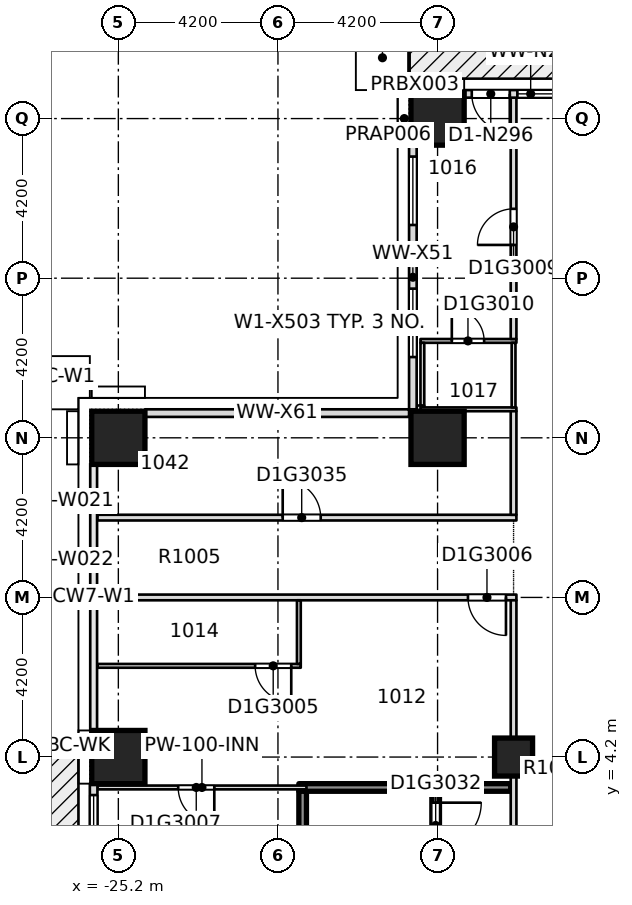
"""IFC4 building model, lengths in metres.
Left out: names, types, materials, properties, quantities, classifications, styles, units other than length and angle.
Written with IfcOpenShell. Run it as: python <this file> out.ifc"""

import sys

from ifc_helpers import new_model, si_unit, direction, frame, frame_2d, origin, origin_2d, place, context, subcontext, project, spatial, rectangle, extrude, element, fill, save


model = new_model("IFC4")
c1 = context("Model", 3, precision=1e-05, world=origin(), true_north=direction((0.0, 1.0)))
c2 = subcontext(c1, "Body", "Model", "MODEL_VIEW")
j1 = project(units=[si_unit("LENGTHUNIT", "METRE"), si_unit("PLANEANGLEUNIT", "RADIAN")], contexts=[c1])
p1 = place(None, origin())
s1 = spatial("IfcSite", under=j1, at=p1, CompositionType="ELEMENT")
p2 = place(p1, origin())
s2 = spatial("IfcBuilding", under=s1, at=p2, CompositionType="ELEMENT")
p3 = place(p2, frame((0.0, 0.0, 48.3)))
s3 = spatial("IfcBuildingStorey", under=s2, at=p3, CompositionType="ELEMENT", Elevation=48.3)
for number, where, z_axis, x_axis in (
    (1, (-25.2, 4.2, -0.32), (0.0, 0.0, 1.0), (1.0, 0.0, 0.0)),
    (2, (-25.2, 12.6, -0.32), (0.0, 0.0, 1.0), (1.0, 0.0, 0.0)),
    (3, (-16.8, 12.6, -0.32), (0.0, 0.0, 1.0), (1.0, 0.0, 0.0)),
    (4, (-16.8, 21.0, -0.32), (0.0, 0.0, 1.0), (1.0, 0.0, 0.0)),
):
    element("IfcColumn", number, at=place(p3, frame(where, z_axis=z_axis, x_axis=x_axis)), inside=s3, PredefinedType="COLUMN", context=c2, shape_type="SweptSolid", body=[
        extrude(rectangle(XDim=1.4, YDim=1.4, at=origin_2d()), origin(), (0.0, 0.0, 1.0), 3.45),
    ])
p4 = place(p3, frame((-14.8, 4.2, -0.32), z_axis=(0.0, 0.0, 1.0), x_axis=(1.0, 0.0, 0.0)))
e5 = element("IfcColumn", 5, at=p4, inside=s3, PredefinedType="COLUMN", context=c2, shape_type="SweptSolid", body=[
    extrude(rectangle(XDim=1.0, YDim=1.0, at=origin_2d()), origin(), (0.0, 0.0, 1.0), 3.45),
])
p5 = place(p3, frame((-25.75, 3.4, 0.0), z_axis=(0.0, 0.0, 1.0), x_axis=(1.0, 0.0, 0.0)))
e6 = element("IfcWall", 6, at=p5, inside=s3, PredefinedType="PARTITIONING", context=c2, shape_type="SweptSolid", body=[
    extrude(rectangle(XDim=5.5, YDim=0.1, at=frame_2d((2.75, 0.0))), origin(), (0.0, 0.0, 1.0), 3.13),
])
p6 = place(p5, frame((2.125, 0.0, 0.0)))
e7 = element("IfcOpeningElement", 7, at=p6, cuts=e6, PredefinedType="OPENING", context=c2, shape_type="SweptSolid", body=[
    extrude(rectangle(XDim=0.95, YDim=2.1, at=frame_2d((0.475, 1.05))), frame((0.0, 0.06, 0.0), z_axis=(0.0, -1.0, 0.0), x_axis=(1.0, 0.0, 0.0)), (0.0, 0.0, 1.0), 0.12),
])
p7 = place(p3, frame((-20.45, 3.4, 0.0), z_axis=(0.0, 0.0, 1.0), x_axis=(1.0, 0.0, 0.0)))
e8 = element("IfcWall", 8, at=p7, inside=s3, PredefinedType="SOLIDWALL", context=c2, shape_type="SweptSolid", body=[
    extrude(rectangle(XDim=5.575, YDim=0.2, at=frame_2d((2.788, 0.0))), origin(), (0.0, 0.0, 1.0), 3.13),
])
p8 = place(p3, frame((-25.75, 6.6, 0.0), z_axis=(0.0, 0.0, 1.0), x_axis=(1.0, 0.0, 0.0)))
e9 = element("IfcWall", 9, at=p8, inside=s3, PredefinedType="PARTITIONING", context=c2, shape_type="SweptSolid", body=[
    extrude(rectangle(XDim=5.35, YDim=0.1, at=frame_2d((2.675, 0.0))), origin(), (0.0, 0.0, 1.0), 3.13),
])
p9 = place(p8, frame((4.15, 0.0, 0.0)))
e10 = element("IfcOpeningElement", 10, at=p9, cuts=e9, PredefinedType="OPENING", context=c2, shape_type="SweptSolid", body=[
    extrude(rectangle(XDim=0.95, YDim=2.1, at=frame_2d((0.475, 1.05))), frame((0.0, 0.06, 0.0), z_axis=(0.0, -1.0, 0.0), x_axis=(1.0, 0.0, 0.0)), (0.0, 0.0, 1.0), 0.12),
])
p10 = place(p3, frame((-25.75, 8.4, 0.0), z_axis=(0.0, 0.0, 1.0), x_axis=(1.0, 0.0, 0.0)))
e11 = element("IfcWall", 11, at=p10, inside=s3, PredefinedType="PARTITIONING", context=c2, shape_type="SweptSolid", body=[
    extrude(rectangle(XDim=11.025, YDim=0.15, at=frame_2d((5.512, 0.0))), origin(), (0.0, 0.0, 1.0), 3.13),
])
p11 = place(p10, frame((9.75, 0.0, 0.0)))
e12 = element("IfcOpeningElement", 12, at=p11, cuts=e11, PredefinedType="OPENING", context=c2, shape_type="SweptSolid", body=[
    extrude(rectangle(XDim=1.0, YDim=2.1, at=frame_2d((0.5, 1.05))), frame((0.0, 0.085, 0.0), z_axis=(0.0, -1.0, 0.0), x_axis=(1.0, 0.0, 0.0)), (0.0, 0.0, 1.0), 0.17),
])
p12 = place(p3, frame((-25.75, 10.5, 0.0), z_axis=(0.0, 0.0, 1.0), x_axis=(1.0, 0.0, 0.0)))
e13 = element("IfcWall", 13, at=p12, inside=s3, PredefinedType="PARTITIONING", context=c2, shape_type="SweptSolid", body=[
    extrude(rectangle(XDim=11.025, YDim=0.15, at=frame_2d((5.512, 0.0))), origin(), (0.0, 0.0, 1.0), 3.13),
])
p13 = place(p12, frame((4.875, 0.0, 0.0)))
e14 = element("IfcOpeningElement", 14, at=p13, cuts=e13, PredefinedType="OPENING", context=c2, shape_type="SweptSolid", body=[
    extrude(rectangle(XDim=1.0, YDim=2.1, at=frame_2d((0.5, 1.05))), frame((0.0, 0.085, 0.0), z_axis=(0.0, -1.0, 0.0), x_axis=(1.0, 0.0, 0.0)), (0.0, 0.0, 1.0), 0.17),
])
p14 = place(p3, frame((-17.35, 13.35, 0.0), z_axis=(0.0, 0.0, 1.0), x_axis=(1.0, 0.0, 0.0)))
e15 = element("IfcWall", 15, at=p14, inside=s3, PredefinedType="PARTITIONING", context=c2, shape_type="SweptSolid", body=[
    extrude(rectangle(XDim=0.2, YDim=0.2, at=frame_2d((0.1, 0.0))), origin(), (0.0, 0.0, 1.0), 3.13),
])
p15 = place(p3, frame((-17.25, 13.35, 0.0), z_axis=(0.0, 0.0, 1.0), x_axis=(1.0, 0.0, 0.0)))
e16 = element("IfcWall", 16, at=p15, inside=s3, PredefinedType="PARTITIONING", context=c2, shape_type="SweptSolid", body=[
    extrude(rectangle(XDim=2.525, YDim=0.1, at=frame_2d((1.262, 0.0))), origin(), (0.0, 0.0, 1.0), 3.13),
])
p16 = place(p3, frame((-17.25, 15.15, 0.0), z_axis=(0.0, 0.0, 1.0), x_axis=(1.0, 0.0, 0.0)))
e17 = element("IfcWall", 17, at=p16, inside=s3, PredefinedType="PARTITIONING", context=c2, shape_type="SweptSolid", body=[
    extrude(rectangle(XDim=2.525, YDim=0.1, at=frame_2d((1.262, 0.0))), origin(), (0.0, 0.0, 1.0), 3.13),
])
p17 = place(p16, frame((0.825, 0.0, 0.0)))
e18 = element("IfcOpeningElement", 18, at=p17, cuts=e17, PredefinedType="OPENING", context=c2, shape_type="SweptSolid", body=[
    extrude(rectangle(XDim=0.85, YDim=2.1, at=frame_2d((0.425, 1.05))), frame((0.0, 0.06, 0.0), z_axis=(0.0, -1.0, 0.0), x_axis=(1.0, 0.0, 0.0)), (0.0, 0.0, 1.0), 0.12),
])
p18 = place(p3, frame((-20.45, 6.65, 0.0), z_axis=(0.0, 0.0, 1.0), x_axis=(0.0, 1.0, 0.0)))
e19 = element("IfcWall", 19, at=p18, inside=s3, PredefinedType="PARTITIONING", context=c2, shape_type="SweptSolid", body=[
    extrude(rectangle(XDim=1.675, YDim=0.1, at=frame_2d((0.837, 0.0))), origin(), (0.0, 0.0, 1.0), 3.13),
])
p19 = place(p3, frame((-20.35, 0.07, 0.0), z_axis=(0.0, 0.0, 1.0), x_axis=(0.0, 1.0, 0.0)))
e20 = element("IfcWall", 20, at=p19, inside=s3, PredefinedType="SOLIDWALL", context=c2, shape_type="SweptSolid", body=[
    extrude(rectangle(XDim=3.23, YDim=0.2, at=frame_2d((1.615, 0.0))), origin(), (0.0, 0.0, 1.0), 3.13),
])
p20 = place(p3, frame((-17.2, 13.45, 0.0), z_axis=(0.0, 0.0, 1.0), x_axis=(0.0, 1.0, 0.0)))
e21 = element("IfcWall", 21, at=p20, inside=s3, PredefinedType="PARTITIONING", context=c2, shape_type="SweptSolid", body=[
    extrude(rectangle(XDim=1.65, YDim=0.1, at=frame_2d((0.825, 0.0))), origin(), (0.0, 0.0, 1.0), 3.13),
])
p21 = place(p3, frame((-16.85, -3.35, 0.0), z_axis=(0.0, 0.0, 1.0), x_axis=(0.0, 1.0, 0.0)))
e22 = element("IfcWall", 22, at=p21, inside=s3, PredefinedType="SOLIDWALL", context=c2, shape_type="SweptSolid", body=[
    extrude(rectangle(XDim=6.65, YDim=0.2, at=frame_2d((3.325, 0.0))), origin(), (0.0, 0.0, 1.0), 3.13),
])
p22 = place(p21, frame((5.15, 0.0, 0.0)))
e23 = element("IfcOpeningElement", 23, at=p22, cuts=e22, PredefinedType="OPENING", context=c2, shape_type="SweptSolid", body=[
    extrude(rectangle(XDim=1.2, YDim=2.1, at=frame_2d((0.6, 1.05))), frame((0.0, 0.11, 0.0), z_axis=(0.0, -1.0, 0.0), x_axis=(1.0, 0.0, 0.0)), (0.0, 0.0, 1.0), 0.22),
])
p23 = place(p3, frame((-14.8, -3.35, 0.0), z_axis=(0.0, 0.0, 1.0), x_axis=(0.0, 1.0, 0.0)))
e24 = element("IfcWall", 24, at=p23, inside=s3, PredefinedType="PARTITIONING", context=c2, shape_type="SweptSolid", body=[
    extrude(rectangle(XDim=11.675, YDim=0.15, at=frame_2d((5.837, 0.0))), origin(), (0.0, 0.0, 1.0), 3.13),
])
p24 = place(p23, frame((2.8, 0.0, 0.0)))
e25 = element("IfcOpeningElement", 25, at=p24, cuts=e24, PredefinedType="OPENING", context=c2, shape_type="SweptSolid", body=[
    extrude(rectangle(XDim=1.1, YDim=2.1, at=frame_2d((0.55, 1.05))), frame((0.0, 0.085, 0.0), z_axis=(0.0, -1.0, 0.0), x_axis=(1.0, 0.0, 0.0)), (0.0, 0.0, 1.0), 0.17),
])
p25 = place(p3, frame((-14.8, 10.575, 0.0), z_axis=(0.0, 0.0, 1.0), x_axis=(0.0, 1.0, 0.0)))
e26 = element("IfcWall", 26, at=p25, inside=s3, PredefinedType="PARTITIONING", context=c2, shape_type="SweptSolid", body=[
    extrude(rectangle(XDim=2.725, YDim=0.15, at=frame_2d((1.363, 0.0))), origin(), (0.0, 0.0, 1.0), 3.13),
])
p26 = place(p3, frame((-14.8, 13.4, 0.0), z_axis=(0.0, 0.0, 1.0), x_axis=(0.0, 1.0, 0.0)))
e27 = element("IfcWall", 27, at=p26, inside=s3, PredefinedType="PARTITIONING", context=c2, shape_type="SweptSolid", body=[
    extrude(rectangle(XDim=1.7, YDim=0.1, at=frame_2d((0.85, 0.0))), origin(), (0.0, 0.0, 1.0), 3.13),
])
p27 = place(p3, frame((-14.8, 15.2, 0.0), z_axis=(0.0, 0.0, 1.0), x_axis=(0.0, 1.0, 0.0)))
e28 = element("IfcWall", 28, at=p27, inside=s3, PredefinedType="PARTITIONING", context=c2, shape_type="SweptSolid", body=[
    extrude(rectangle(XDim=6.35, YDim=0.15, at=frame_2d((3.175, 0.0))), origin(), (0.0, 0.0, 1.0), 3.13),
])
p28 = place(p27, frame((2.475, 0.0, 0.0)))
e29 = element("IfcOpeningElement", 29, at=p28, cuts=e28, PredefinedType="OPENING", context=c2, shape_type="SweptSolid", body=[
    extrude(rectangle(XDim=0.95, YDim=2.1, at=frame_2d((0.475, 1.05))), frame((0.0, 0.085, 0.0), z_axis=(0.0, -1.0, 0.0), x_axis=(1.0, 0.0, 0.0)), (0.0, 0.0, 1.0), 0.17),
])
p29 = place(p3, frame((-12.6, 21.65, 0.0), z_axis=(0.0, 0.0, 1.0), x_axis=(-1.0, 0.0, 0.0)))
e30 = element("IfcWall", 30, at=p29, inside=s3, PredefinedType="STANDARD", context=c2, shape_type="SweptSolid", body=[
    extrude(rectangle(XDim=3.5, YDim=0.2, at=frame_2d((1.75, 0.0))), origin(), (0.0, 0.0, 1.0), 3.13),
])
p30 = place(p29, frame((0.3, 0.0, 0.2)))
e31 = element("IfcOpeningElement", 31, at=p30, cuts=e30, PredefinedType="OPENING", context=c2, shape_type="SweptSolid", body=[
    extrude(rectangle(XDim=1.8, YDim=2.65, at=frame_2d((0.9, 1.325))), frame((0.0, 0.11, 0.0), z_axis=(0.0, -1.0, 0.0), x_axis=(1.0, 0.0, 0.0)), (0.0, 0.0, 1.0), 0.22),
])
p31 = place(p29, frame((2.3, 0.0, 0.0)))
e32 = element("IfcOpeningElement", 32, at=p31, cuts=e30, PredefinedType="OPENING", context=c2, shape_type="SweptSolid", body=[
    extrude(rectangle(XDim=1.0, YDim=2.4, at=frame_2d((0.5, 1.2))), frame((0.0, 0.11, 0.0), z_axis=(0.0, -1.0, 0.0), x_axis=(1.0, 0.0, 0.0)), (0.0, 0.0, 1.0), 0.22),
])
p32 = place(p3, frame((-17.45, 20.3, 0.0), z_axis=(0.0, 0.0, 1.0), x_axis=(0.0, -1.0, 0.0)))
e33 = element("IfcWall", 33, at=p32, inside=s3, PredefinedType="STANDARD", context=c2, shape_type="SweptSolid", body=[
    extrude(rectangle(XDim=6.95, YDim=0.2, at=frame_2d((3.475, 0.0))), origin(), (0.0, 0.0, 1.0), 3.13),
])
p33 = place(p32, frame((3.775, 0.0, 0.2)))
e34 = element("IfcOpeningElement", 34, at=p33, cuts=e33, PredefinedType="OPENING", context=c2, shape_type="SweptSolid", body=[
    extrude(rectangle(XDim=1.8, YDim=2.65, at=frame_2d((0.9, 1.325))), frame((0.0, 0.11, 0.0), z_axis=(0.0, -1.0, 0.0), x_axis=(1.0, 0.0, 0.0)), (0.0, 0.0, 1.0), 0.22),
])
p34 = place(p32, frame((0.3, 0.0, 0.2)))
e35 = element("IfcOpeningElement", 35, at=p34, cuts=e33, PredefinedType="OPENING", context=c2, shape_type="SweptSolid", body=[
    extrude(rectangle(XDim=1.8, YDim=2.65, at=frame_2d((0.9, 1.325))), frame((0.0, 0.11, 0.0), z_axis=(0.0, -1.0, 0.0), x_axis=(1.0, 0.0, 0.0)), (0.0, 0.0, 1.0), 0.22),
])
p35 = place(p3, frame((-17.55, 13.25, 0.0), z_axis=(0.0, 0.0, 1.0), x_axis=(-1.0, 0.0, 0.0)))
e36 = element("IfcWall", 36, at=p35, inside=s3, PredefinedType="STANDARD", context=c2, shape_type="SweptSolid", body=[
    extrude(rectangle(XDim=6.95, YDim=0.2, at=frame_2d((3.475, 0.0))), origin(), (0.0, 0.0, 1.0), 3.13),
])
p36 = place(p3, frame((-25.85, 3.5, 0.0), z_axis=(0.0, 0.0, 1.0), x_axis=(0.0, -1.0, 0.0)))
e37 = element("IfcWall", 37, at=p36, inside=s3, PredefinedType="STANDARD", context=c2, shape_type="SweptSolid", body=[
    extrude(rectangle(XDim=7.0, YDim=0.2, at=frame_2d((3.5, 0.0))), origin(), (0.0, 0.0, 1.0), 3.13),
])
p37 = place(p36, frame((3.8, 0.0, 0.2)))
e38 = element("IfcOpeningElement", 38, at=p37, cuts=e37, PredefinedType="OPENING", context=c2, shape_type="SweptSolid", body=[
    extrude(rectangle(XDim=1.8, YDim=2.65, at=frame_2d((0.9, 1.325))), frame((0.0, 0.11, 0.0), z_axis=(0.0, -1.0, 0.0), x_axis=(1.0, 0.0, 0.0)), (0.0, 0.0, 1.0), 0.22),
])
p38 = place(p36, frame((5.7, 0.0, 0.0)))
e39 = element("IfcOpeningElement", 39, at=p38, cuts=e37, PredefinedType="OPENING", context=c2, shape_type="SweptSolid", body=[
    extrude(rectangle(XDim=1.0, YDim=2.4, at=frame_2d((0.5, 1.2))), frame((0.0, 0.11, 0.0), z_axis=(0.0, -1.0, 0.0), x_axis=(1.0, 0.0, 0.0)), (0.0, 0.0, 1.0), 0.22),
])
p39 = place(p36, frame((0.3, 0.0, 0.2)))
e40 = element("IfcOpeningElement", 40, at=p39, cuts=e37, PredefinedType="OPENING", context=c2, shape_type="SweptSolid", body=[
    extrude(rectangle(XDim=1.8, YDim=2.65, at=frame_2d((0.9, 1.325))), frame((0.0, 0.11, 0.0), z_axis=(0.0, -1.0, 0.0), x_axis=(1.0, 0.0, 0.0)), (0.0, 0.0, 1.0), 0.22),
])
p40 = place(p36, frame((2.2, 0.0, 0.0)))
e41 = element("IfcOpeningElement", 41, at=p40, cuts=e37, PredefinedType="OPENING", context=c2, shape_type="SweptSolid", body=[
    extrude(rectangle(XDim=1.0, YDim=2.4, at=frame_2d((0.5, 1.2))), frame((0.0, 0.11, 0.0), z_axis=(0.0, -1.0, 0.0), x_axis=(1.0, 0.0, 0.0)), (0.0, 0.0, 1.0), 0.22),
])
p41 = place(p9, origin())
e42 = element("IfcDoor", 42, at=p41, inside=s3, OperationType="SINGLE_SWING_LEFT", PredefinedType="DOOR", context=c2, shape_type="SweptSolid", body=[
    extrude(rectangle(XDim=0.95, YDim=2.1, at=frame_2d((0.475, 1.05))), frame((0.0, 0.025, 0.0), z_axis=(0.0, -1.0, 0.0), x_axis=(1.0, 0.0, 0.0)), (0.0, 0.0, 1.0), 0.05),
])
fill(e10, e42)
p42 = place(p11, origin())
e43 = element("IfcDoor", 43, at=p42, inside=s3, OperationType="SINGLE_SWING_RIGHT", PredefinedType="DOOR", context=c2, shape_type="SweptSolid", body=[
    extrude(rectangle(XDim=1.0, YDim=2.1, at=frame_2d((0.5, 1.05))), frame((0.0, 0.025, 0.0), z_axis=(0.0, -1.0, 0.0), x_axis=(1.0, 0.0, 0.0)), (0.0, 0.0, 1.0), 0.05),
])
fill(e12, e43)
p43 = place(p6, origin())
e44 = element("IfcDoor", 44, at=p43, inside=s3, OperationType="SINGLE_SWING_LEFT", PredefinedType="DOOR", context=c2, shape_type="SweptSolid", body=[
    extrude(rectangle(XDim=0.95, YDim=2.1, at=frame_2d((0.475, 1.05))), frame((0.0, 0.025, 0.0), z_axis=(0.0, -1.0, 0.0), x_axis=(1.0, 0.0, 0.0)), (0.0, 0.0, 1.0), 0.05),
])
fill(e7, e44)
p44 = place(p28, origin())
e45 = element("IfcDoor", 45, at=p44, inside=s3, OperationType="SINGLE_SWING_RIGHT", PredefinedType="DOOR", context=c2, shape_type="SweptSolid", body=[
    extrude(rectangle(XDim=0.95, YDim=2.1, at=frame_2d((0.475, 1.05))), frame((0.0, 0.025, 0.0), z_axis=(0.0, -1.0, 0.0), x_axis=(1.0, 0.0, 0.0)), (0.0, 0.0, 1.0), 0.05),
])
fill(e29, e45)
p45 = place(p17, origin())
e46 = element("IfcDoor", 46, at=p45, inside=s3, OperationType="SINGLE_SWING_RIGHT", PredefinedType="DOOR", context=c2, shape_type="SweptSolid", body=[
    extrude(rectangle(XDim=0.85, YDim=2.1, at=frame_2d((0.425, 1.05))), frame((0.0, 0.025, 0.0), z_axis=(0.0, -1.0, 0.0), x_axis=(1.0, 0.0, 0.0)), (0.0, 0.0, 1.0), 0.05),
])
fill(e18, e46)
p46 = place(p22, origin())
e47 = element("IfcDoor", 47, at=p46, inside=s3, OperationType="SINGLE_SWING_RIGHT", PredefinedType="DOOR", context=c2, shape_type="SweptSolid", body=[
    extrude(rectangle(XDim=1.2, YDim=2.1, at=frame_2d((0.6, 1.05))), frame((0.0, 0.025, 0.0), z_axis=(0.0, -1.0, 0.0), x_axis=(1.0, 0.0, 0.0)), (0.0, 0.0, 1.0), 0.05),
])
fill(e23, e47)
p47 = place(p13, origin())
e48 = element("IfcDoor", 48, at=p47, inside=s3, OperationType="SINGLE_SWING_RIGHT", PredefinedType="DOOR", context=c2, shape_type="SweptSolid", body=[
    extrude(rectangle(XDim=1.0, YDim=2.1, at=frame_2d((0.5, 1.05))), frame((0.0, 0.025, 0.0), z_axis=(0.0, -1.0, 0.0), x_axis=(1.0, 0.0, 0.0)), (0.0, 0.0, 1.0), 0.05),
])
fill(e14, e48)
p48 = place(p30, origin())
e49 = element("IfcWindow", 49, at=p48, inside=s3, PartitioningType="SINGLE_PANEL", PredefinedType="WINDOW", context=c2, shape_type="SweptSolid", body=[
    extrude(rectangle(XDim=1.8, YDim=2.65, at=frame_2d((0.9, 1.325))), frame((0.0, 0.03, 0.0), z_axis=(0.0, -1.0, 0.0), x_axis=(1.0, 0.0, 0.0)), (0.0, 0.0, 1.0), 0.06),
])
fill(e31, e49)
p49 = place(p31, origin())
e50 = element("IfcDoor", 50, at=p49, inside=s3, OperationType="SINGLE_SWING_LEFT", PredefinedType="DOOR", context=c2, shape_type="SweptSolid", body=[
    extrude(rectangle(XDim=1.0, YDim=2.4, at=frame_2d((0.5, 1.2))), frame((0.0, 0.025, 0.0), z_axis=(0.0, -1.0, 0.0), x_axis=(1.0, 0.0, 0.0)), (0.0, 0.0, 1.0), 0.05),
])
fill(e32, e50)
p50 = place(p33, origin())
e51 = element("IfcWindow", 51, at=p50, inside=s3, PartitioningType="SINGLE_PANEL", PredefinedType="WINDOW", context=c2, shape_type="SweptSolid", body=[
    extrude(rectangle(XDim=1.8, YDim=2.65, at=frame_2d((0.9, 1.325))), frame((0.0, 0.03, 0.0), z_axis=(0.0, -1.0, 0.0), x_axis=(1.0, 0.0, 0.0)), (0.0, 0.0, 1.0), 0.06),
])
fill(e34, e51)
p51 = place(p34, origin())
e52 = element("IfcWindow", 52, at=p51, inside=s3, PartitioningType="SINGLE_PANEL", PredefinedType="WINDOW", context=c2, shape_type="SweptSolid", body=[
    extrude(rectangle(XDim=1.8, YDim=2.65, at=frame_2d((0.9, 1.325))), frame((0.0, 0.03, 0.0), z_axis=(0.0, -1.0, 0.0), x_axis=(1.0, 0.0, 0.0)), (0.0, 0.0, 1.0), 0.06),
])
fill(e35, e52)
p52 = place(p39, origin())
e53 = element("IfcWindow", 53, at=p52, inside=s3, PartitioningType="SINGLE_PANEL", PredefinedType="WINDOW", context=c2, shape_type="SweptSolid", body=[
    extrude(rectangle(XDim=1.8, YDim=2.65, at=frame_2d((0.9, 1.325))), frame((0.0, 0.03, 0.0), z_axis=(0.0, -1.0, 0.0), x_axis=(1.0, 0.0, 0.0)), (0.0, 0.0, 1.0), 0.06),
])
fill(e40, e53)
save(model, sys.argv[1])
